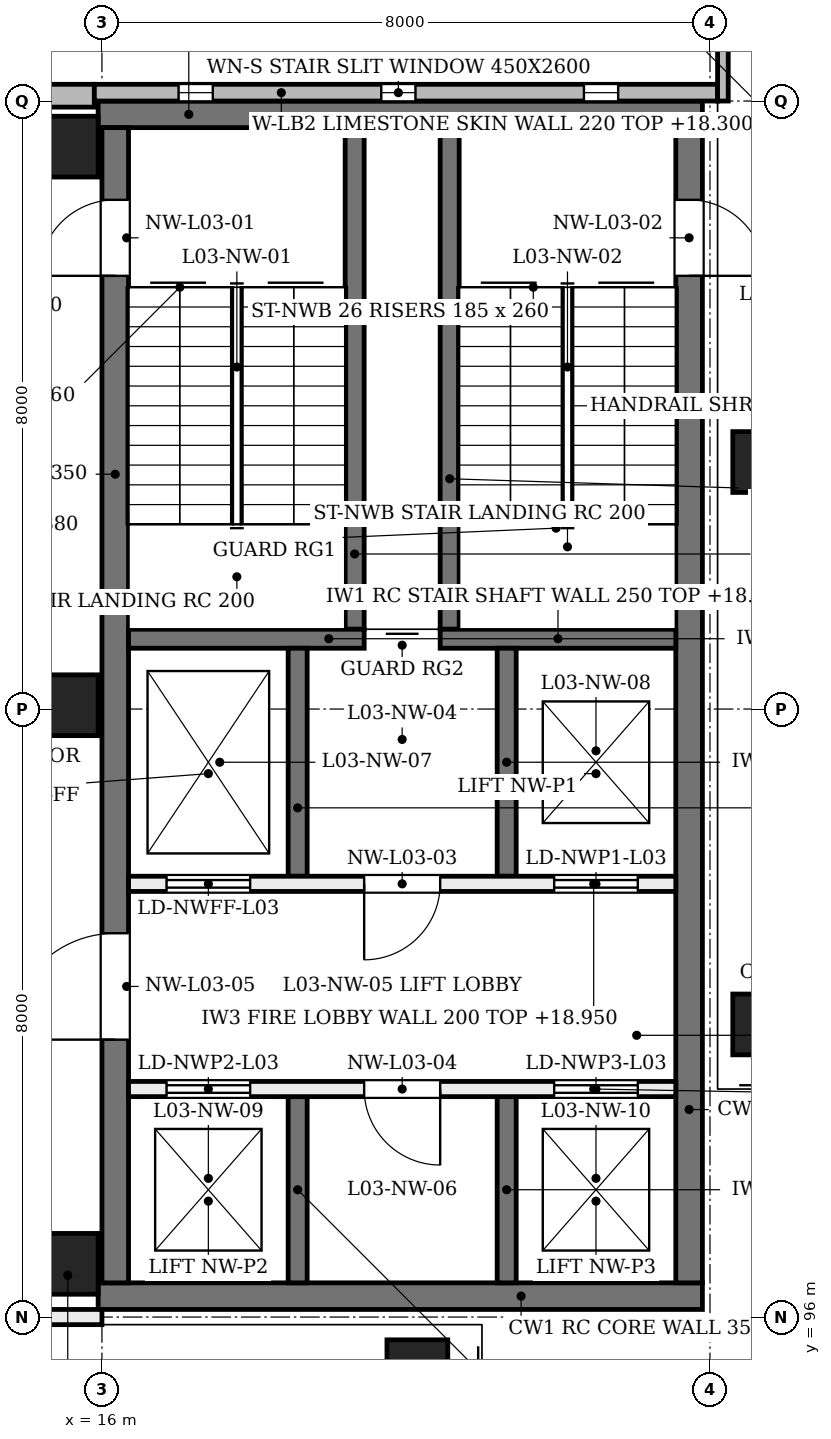
"""IFC4 building model, lengths in metres.
Left out: names, types, materials, properties, quantities, classifications, styles, units other than length and angle.
Written with IfcOpenShell. Run it as: python <this file> out.ifc"""

import sys

from ifc_helpers import new_model, si_unit, direction, frame, frame_2d, origin, origin_2d, place, context, subcontext, project, spatial, rectangle, extrude, element, fill, save


model = new_model("IFC4")
c1 = context("Model", 3, precision=1e-05, world=origin(), true_north=direction((0.0, 1.0)))
c2 = subcontext(c1, "Body", "Model", "MODEL_VIEW")
j1 = project(units=[si_unit("LENGTHUNIT", "METRE"), si_unit("PLANEANGLEUNIT", "RADIAN")], contexts=[c1])
p1 = place(None, origin())
s1 = spatial("IfcSite", under=j1, at=p1, CompositionType="ELEMENT")
p2 = place(p1, origin())
s2 = spatial("IfcBuilding", under=s1, at=p2, CompositionType="ELEMENT")
p3 = place(p2, frame((0.0, 0.0, 14.4)))
s3 = spatial("IfcBuildingStorey", under=s2, at=p3, CompositionType="ELEMENT", Elevation=14.4)
for number, where, z_axis, x_axis in (
    (1, (15.95, 96.275, 0.0), (0.0, 0.0, 1.0), (1.0, 0.0, 0.0)),
    (2, (15.95, 111.825, 0.0), (0.0, 0.0, 1.0), (1.0, 0.0, 0.0)),
):
    element("IfcWall", number, at=place(p3, frame(where, z_axis=z_axis, x_axis=x_axis)), inside=s3, PredefinedType="SHEAR", context=c2, shape_type="SweptSolid", body=[
        extrude(rectangle(XDim=7.95, YDim=0.35, at=frame_2d((3.975, 0.0))), origin(), (0.0, 0.0, 1.0), 4.58),
    ])
p4 = place(p3, frame((16.175, 96.45, 0.0), z_axis=(0.0, 0.0, 1.0), x_axis=(0.0, 1.0, 0.0)))
e3 = element("IfcWall", 3, at=p4, inside=s3, PredefinedType="SHEAR", context=c2, shape_type="SweptSolid", body=[
    extrude(rectangle(XDim=15.2, YDim=0.35, at=frame_2d((7.6, 0.0))), origin(), (0.0, 0.0, 1.0), 4.58),
])
p5 = place(p4, frame((13.25, 0.0, 0.0)))
e4 = element("IfcOpeningElement", 4, at=p5, cuts=e3, PredefinedType="OPENING", context=c2, shape_type="SweptSolid", body=[
    extrude(rectangle(XDim=1.0, YDim=2.1, at=frame_2d((0.5, 1.05))), frame((0.0, 0.185, 0.0), z_axis=(0.0, -1.0, 0.0), x_axis=(1.0, 0.0, 0.0)), (0.0, 0.0, 1.0), 0.37),
])
p6 = place(p4, frame((3.2, 0.0, 0.0)))
e5 = element("IfcOpeningElement", 5, at=p6, cuts=e3, PredefinedType="OPENING", context=c2, shape_type="SweptSolid", body=[
    extrude(rectangle(XDim=1.4, YDim=2.1, at=frame_2d((0.7, 1.05))), frame((0.0, 0.185, 0.0), z_axis=(0.0, -1.0, 0.0), x_axis=(1.0, 0.0, 0.0)), (0.0, 0.0, 1.0), 0.37),
])
p7 = place(p3, frame((23.725, 96.45, 0.0), z_axis=(0.0, 0.0, 1.0), x_axis=(0.0, 1.0, 0.0)))
e6 = element("IfcWall", 6, at=p7, inside=s3, PredefinedType="SHEAR", context=c2, shape_type="SweptSolid", body=[
    extrude(rectangle(XDim=15.2, YDim=0.35, at=frame_2d((7.6, 0.0))), origin(), (0.0, 0.0, 1.0), 4.58),
])
p8 = place(p7, frame((13.25, 0.0, 0.0)))
e7 = element("IfcOpeningElement", 7, at=p8, cuts=e6, PredefinedType="OPENING", context=c2, shape_type="SweptSolid", body=[
    extrude(rectangle(XDim=1.0, YDim=2.1, at=frame_2d((0.5, 1.05))), frame((0.0, 0.185, 0.0), z_axis=(0.0, -1.0, 0.0), x_axis=(1.0, 0.0, 0.0)), (0.0, 0.0, 1.0), 0.37),
])
for number, where, z_axis, x_axis in (
    (8, (15.55, 96.7, 0.0), (0.0, 0.0, 1.0), (1.0, 0.0, 0.0)),
    (9, (15.55, 104.05, 0.0), (0.0, 0.0, 1.0), (1.0, 0.0, 0.0)),
    (10, (15.55, 111.4, 0.0), (0.0, 0.0, 1.0), (1.0, 0.0, 0.0)),
):
    element("IfcColumn", number, at=place(p3, frame(where, z_axis=z_axis, x_axis=x_axis)), inside=s3, PredefinedType="COLUMN", context=c2, shape_type="SweptSolid", body=[
        extrude(rectangle(XDim=0.8, YDim=0.8, at=origin_2d()), origin(), (0.0, 0.0, 1.0), 4.8),
    ])
for number, where, z_axis, x_axis in (
    (11, (24.7, 99.6, 0.0), (0.0, 0.204, 0.979), (-1.0, 0.0, 0.0)),
    (12, (24.7, 107.0, 0.0), (0.0, 0.204, 0.979), (-1.0, 0.0, 0.0)),
    (13, (20.4, 95.3, 0.0), (-0.204, 0.0, 0.979), (0.0, -1.0, 0.0)),
):
    element("IfcColumn", number, at=place(p3, frame(where, z_axis=z_axis, x_axis=x_axis)), inside=s3, PredefinedType="COLUMN", context=c2, shape_type="SweptSolid", body=[
        extrude(rectangle(XDim=0.8, YDim=0.8, at=origin_2d()), origin(), (0.0, 0.0, 1.0), 4.903),
    ])
p9 = place(p3, frame((8.0, 112.07, 0.0), z_axis=(0.0, 0.0, 1.0), x_axis=(1.0, 0.0, 0.0)))
e14 = element("IfcWall", 14, at=p9, inside=s3, PredefinedType="SOLIDWALL", context=c2, shape_type="SweptSolid", body=[
    extrude(rectangle(XDim=7.9, YDim=0.3, at=frame_2d((3.95, 0.0))), origin(), (0.0, 0.0, 1.0), 3.9),
])
p10 = place(p9, frame((0.717, 0.0, 0.75)))
e15 = element("IfcOpeningElement", 15, at=p10, cuts=e14, PredefinedType="OPENING", context=c2, shape_type="SweptSolid", body=[
    extrude(rectangle(XDim=1.2, YDim=3.1, at=frame_2d((0.6, 1.55))), frame((0.0, 0.16, 0.0), z_axis=(0.0, -1.0, 0.0), x_axis=(1.0, 0.0, 0.0)), (0.0, 0.0, 1.0), 0.32),
])
p11 = place(p9, frame((3.35, 0.0, 0.75)))
e16 = element("IfcOpeningElement", 16, at=p11, cuts=e14, PredefinedType="OPENING", context=c2, shape_type="SweptSolid", body=[
    extrude(rectangle(XDim=1.2, YDim=3.1, at=frame_2d((0.6, 1.55))), frame((0.0, 0.16, 0.0), z_axis=(0.0, -1.0, 0.0), x_axis=(1.0, 0.0, 0.0)), (0.0, 0.0, 1.0), 0.32),
])
p12 = place(p9, frame((5.983, 0.0, 0.75)))
e17 = element("IfcOpeningElement", 17, at=p12, cuts=e14, PredefinedType="OPENING", context=c2, shape_type="SweptSolid", body=[
    extrude(rectangle(XDim=1.2, YDim=3.1, at=frame_2d((0.6, 1.55))), frame((0.0, 0.16, 0.0), z_axis=(0.0, -1.0, 0.0), x_axis=(1.0, 0.0, 0.0)), (0.0, 0.0, 1.0), 0.32),
])
p13 = place(p3, frame((15.9, 112.11, 0.0), z_axis=(0.0, 0.0, 1.0), x_axis=(1.0, 0.0, 0.0)))
e18 = element("IfcWall", 18, at=p13, inside=s3, PredefinedType="SOLIDWALL", context=c2, shape_type="SweptSolid", body=[
    extrude(rectangle(XDim=8.2, YDim=0.22, at=frame_2d((4.1, 0.0))), origin(), (0.0, 0.0, 1.0), 3.9),
])
p14 = place(p13, frame((1.108, 0.0, 0.9)))
e19 = element("IfcOpeningElement", 19, at=p14, cuts=e18, PredefinedType="OPENING", context=c2, shape_type="SweptSolid", body=[
    extrude(rectangle(XDim=0.45, YDim=2.6, at=frame_2d((0.225, 1.3))), frame((0.0, 0.12, 0.0), z_axis=(0.0, -1.0, 0.0), x_axis=(1.0, 0.0, 0.0)), (0.0, 0.0, 1.0), 0.24),
])
p15 = place(p13, frame((3.775, 0.0, 0.9)))
e20 = element("IfcOpeningElement", 20, at=p15, cuts=e18, PredefinedType="OPENING", context=c2, shape_type="SweptSolid", body=[
    extrude(rectangle(XDim=0.45, YDim=2.6, at=frame_2d((0.225, 1.3))), frame((0.0, 0.12, 0.0), z_axis=(0.0, -1.0, 0.0), x_axis=(1.0, 0.0, 0.0)), (0.0, 0.0, 1.0), 0.24),
])
p16 = place(p13, frame((6.442, 0.0, 0.9)))
e21 = element("IfcOpeningElement", 21, at=p16, cuts=e18, PredefinedType="OPENING", context=c2, shape_type="SweptSolid", body=[
    extrude(rectangle(XDim=0.45, YDim=2.6, at=frame_2d((0.225, 1.3))), frame((0.0, 0.12, 0.0), z_axis=(0.0, -1.0, 0.0), x_axis=(1.0, 0.0, 0.0)), (0.0, 0.0, 1.0), 0.24),
])
p17 = place(p3, frame((24.17, 112.0, 0.0), z_axis=(0.0, 0.0, 1.0), x_axis=(0.0, 1.0, 0.0)))
e22 = element("IfcWall", 22, at=p17, inside=s3, PredefinedType="SOLIDWALL", context=c2, shape_type="SweptSolid", body=[
    extrude(rectangle(XDim=3.0, YDim=0.14, at=frame_2d((1.5, 0.0))), origin(), (0.0, 0.0, 1.0), 3.9),
])
for number, where, z_axis, x_axis in (
    (23, (19.325, 111.65, 0.0), (0.0, 0.0, 1.0), (0.0, -1.0, 0.0)),
    (24, (20.575, 111.65, 0.0), (0.0, 0.0, 1.0), (0.0, -1.0, 0.0)),
):
    element("IfcWall", number, at=place(p3, frame(where, z_axis=z_axis, x_axis=x_axis)), inside=s3, PredefinedType="SOLIDWALL", context=c2, shape_type="SweptSolid", body=[
        extrude(rectangle(XDim=6.6, YDim=0.25, at=frame_2d((3.3, 0.0))), origin(), (0.0, 0.0, 1.0), 4.55),
    ])
p18 = place(p3, frame((16.35, 104.925, 0.0), z_axis=(0.0, 0.0, 1.0), x_axis=(1.0, 0.0, 0.0)))
e25 = element("IfcWall", 25, at=p18, inside=s3, PredefinedType="SOLIDWALL", context=c2, shape_type="SweptSolid", body=[
    extrude(rectangle(XDim=3.1, YDim=0.25, at=frame_2d((1.55, 0.0))), origin(), (0.0, 0.0, 1.0), 4.55),
])
p19 = place(p3, frame((20.45, 104.925, 0.0), z_axis=(0.0, 0.0, 1.0), x_axis=(1.0, 0.0, 0.0)))
e26 = element("IfcWall", 26, at=p19, inside=s3, PredefinedType="SOLIDWALL", context=c2, shape_type="SweptSolid", body=[
    extrude(rectangle(XDim=3.1, YDim=0.25, at=frame_2d((1.55, 0.0))), origin(), (0.0, 0.0, 1.0), 4.55),
])
p20 = place(p3, frame((18.575, 104.8, 0.0), z_axis=(0.0, 0.0, 1.0), x_axis=(0.0, -1.0, 0.0)))
e27 = element("IfcWall", 27, at=p20, inside=s3, PredefinedType="SOLIDWALL", context=c2, shape_type="SweptSolid", body=[
    extrude(rectangle(XDim=3.0, YDim=0.25, at=frame_2d((1.5, 0.0))), origin(), (0.0, 0.0, 1.0), 4.55),
])
p21 = place(p3, frame((18.575, 98.9, 0.0), z_axis=(0.0, 0.0, 1.0), x_axis=(0.0, -1.0, 0.0)))
e28 = element("IfcWall", 28, at=p21, inside=s3, PredefinedType="SOLIDWALL", context=c2, shape_type="SweptSolid", body=[
    extrude(rectangle(XDim=2.45, YDim=0.25, at=frame_2d((1.225, 0.0))), origin(), (0.0, 0.0, 1.0), 4.55),
])
p22 = place(p3, frame((21.325, 104.8, 0.0), z_axis=(0.0, 0.0, 1.0), x_axis=(0.0, -1.0, 0.0)))
e29 = element("IfcWall", 29, at=p22, inside=s3, PredefinedType="SOLIDWALL", context=c2, shape_type="SweptSolid", body=[
    extrude(rectangle(XDim=3.0, YDim=0.25, at=frame_2d((1.5, 0.0))), origin(), (0.0, 0.0, 1.0), 4.55),
])
p23 = place(p3, frame((21.325, 98.9, 0.0), z_axis=(0.0, 0.0, 1.0), x_axis=(0.0, -1.0, 0.0)))
e30 = element("IfcWall", 30, at=p23, inside=s3, PredefinedType="SOLIDWALL", context=c2, shape_type="SweptSolid", body=[
    extrude(rectangle(XDim=2.45, YDim=0.25, at=frame_2d((1.225, 0.0))), origin(), (0.0, 0.0, 1.0), 4.55),
])
p24 = place(p3, frame((16.35, 101.7, 0.0), z_axis=(0.0, 0.0, 1.0), x_axis=(1.0, 0.0, 0.0)))
e31 = element("IfcWall", 31, at=p24, inside=s3, PredefinedType="SOLIDWALL", context=c2, shape_type="SweptSolid", body=[
    extrude(rectangle(XDim=7.2, YDim=0.2, at=frame_2d((3.6, 0.0))), origin(), (0.0, 0.0, 1.0), 4.55),
])
p25 = place(p24, frame((0.5, 0.0, 0.0)))
e32 = element("IfcOpeningElement", 32, at=p25, cuts=e31, PredefinedType="OPENING", context=c2, shape_type="SweptSolid", body=[
    extrude(rectangle(XDim=1.1, YDim=2.1, at=frame_2d((0.55, 1.05))), frame((0.0, 0.11, 0.0), z_axis=(0.0, -1.0, 0.0), x_axis=(1.0, 0.0, 0.0)), (0.0, 0.0, 1.0), 0.22),
])
p26 = place(p24, frame((5.6, 0.0, 0.0)))
e33 = element("IfcOpeningElement", 33, at=p26, cuts=e31, PredefinedType="OPENING", context=c2, shape_type="SweptSolid", body=[
    extrude(rectangle(XDim=1.1, YDim=2.1, at=frame_2d((0.55, 1.05))), frame((0.0, 0.11, 0.0), z_axis=(0.0, -1.0, 0.0), x_axis=(1.0, 0.0, 0.0)), (0.0, 0.0, 1.0), 0.22),
])
p27 = place(p24, frame((3.1, 0.0, 0.0)))
e34 = element("IfcOpeningElement", 34, at=p27, cuts=e31, PredefinedType="OPENING", context=c2, shape_type="SweptSolid", body=[
    extrude(rectangle(XDim=1.0, YDim=2.1, at=frame_2d((0.5, 1.05))), frame((0.0, 0.11, 0.0), z_axis=(0.0, -1.0, 0.0), x_axis=(1.0, 0.0, 0.0)), (0.0, 0.0, 1.0), 0.22),
])
p28 = place(p3, frame((16.35, 99.0, 0.0), z_axis=(0.0, 0.0, 1.0), x_axis=(1.0, 0.0, 0.0)))
e35 = element("IfcWall", 35, at=p28, inside=s3, PredefinedType="SOLIDWALL", context=c2, shape_type="SweptSolid", body=[
    extrude(rectangle(XDim=7.2, YDim=0.2, at=frame_2d((3.6, 0.0))), origin(), (0.0, 0.0, 1.0), 4.55),
])
p29 = place(p28, frame((0.5, 0.0, 0.0)))
e36 = element("IfcOpeningElement", 36, at=p29, cuts=e35, PredefinedType="OPENING", context=c2, shape_type="SweptSolid", body=[
    extrude(rectangle(XDim=1.1, YDim=2.1, at=frame_2d((0.55, 1.05))), frame((0.0, 0.11, 0.0), z_axis=(0.0, -1.0, 0.0), x_axis=(1.0, 0.0, 0.0)), (0.0, 0.0, 1.0), 0.22),
])
p30 = place(p28, frame((5.6, 0.0, 0.0)))
e37 = element("IfcOpeningElement", 37, at=p30, cuts=e35, PredefinedType="OPENING", context=c2, shape_type="SweptSolid", body=[
    extrude(rectangle(XDim=1.1, YDim=2.1, at=frame_2d((0.55, 1.05))), frame((0.0, 0.11, 0.0), z_axis=(0.0, -1.0, 0.0), x_axis=(1.0, 0.0, 0.0)), (0.0, 0.0, 1.0), 0.22),
])
p31 = place(p28, frame((3.1, 0.0, 0.0)))
e38 = element("IfcOpeningElement", 38, at=p31, cuts=e35, PredefinedType="OPENING", context=c2, shape_type="SweptSolid", body=[
    extrude(rectangle(XDim=1.0, YDim=2.1, at=frame_2d((0.5, 1.05))), frame((0.0, 0.11, 0.0), z_axis=(0.0, -1.0, 0.0), x_axis=(1.0, 0.0, 0.0)), (0.0, 0.0, 1.0), 0.22),
])
p32 = place(p3, frame((14.0, 96.0, 0.0), z_axis=(0.0, 0.0, 1.0), x_axis=(1.0, 0.0, 0.0)))
e39 = element("IfcWall", 39, at=p32, inside=s3, PredefinedType="PARTITIONING", context=c2, shape_type="SweptSolid", body=[
    extrude(rectangle(XDim=2.0, YDim=0.2, at=frame_2d((1.0, 0.0))), origin(), (0.0, 0.0, 1.0), 3.88),
])
p33 = place(p32, frame((0.05, 0.0, 0.0)))
e40 = element("IfcOpeningElement", 40, at=p33, cuts=e39, PredefinedType="OPENING", context=c2, shape_type="SweptSolid", body=[
    extrude(rectangle(XDim=1.0, YDim=2.1, at=frame_2d((0.5, 1.05))), frame((0.0, 0.11, 0.0), z_axis=(0.0, -1.0, 0.0), x_axis=(1.0, 0.0, 0.0)), (0.0, 0.0, 1.0), 0.22),
])
p34 = place(p14, origin())
e41 = element("IfcWindow", 41, at=p34, inside=s3, PartitioningType="SINGLE_PANEL", PredefinedType="WINDOW", context=c2, shape_type="SweptSolid", body=[
    extrude(rectangle(XDim=0.45, YDim=2.6, at=frame_2d((0.225, 1.3))), frame((0.0, 0.03, 0.0), z_axis=(0.0, -1.0, 0.0), x_axis=(1.0, 0.0, 0.0)), (0.0, 0.0, 1.0), 0.06),
])
fill(e19, e41)
p35 = place(p15, origin())
e42 = element("IfcWindow", 42, at=p35, inside=s3, PartitioningType="SINGLE_PANEL", PredefinedType="WINDOW", context=c2, shape_type="SweptSolid", body=[
    extrude(rectangle(XDim=0.45, YDim=2.6, at=frame_2d((0.225, 1.3))), frame((0.0, 0.03, 0.0), z_axis=(0.0, -1.0, 0.0), x_axis=(1.0, 0.0, 0.0)), (0.0, 0.0, 1.0), 0.06),
])
fill(e20, e42)
p36 = place(p16, origin())
e43 = element("IfcWindow", 43, at=p36, inside=s3, PartitioningType="SINGLE_PANEL", PredefinedType="WINDOW", context=c2, shape_type="SweptSolid", body=[
    extrude(rectangle(XDim=0.45, YDim=2.6, at=frame_2d((0.225, 1.3))), frame((0.0, 0.03, 0.0), z_axis=(0.0, -1.0, 0.0), x_axis=(1.0, 0.0, 0.0)), (0.0, 0.0, 1.0), 0.06),
])
fill(e21, e43)
p37 = place(p5, origin())
e44 = element("IfcDoor", 44, at=p37, inside=s3, OperationType="SINGLE_SWING_LEFT", PredefinedType="DOOR", context=c2, shape_type="SweptSolid", body=[
    extrude(rectangle(XDim=1.0, YDim=2.1, at=frame_2d((0.5, 1.05))), frame((0.0, 0.025, 0.0), z_axis=(0.0, -1.0, 0.0), x_axis=(1.0, 0.0, 0.0)), (0.0, 0.0, 1.0), 0.05),
])
fill(e4, e44)
p38 = place(p8, frame((1.0, 0.0, 0.0), z_axis=(0.0, 0.0, 1.0), x_axis=(-1.0, 0.0, 0.0)))
e45 = element("IfcDoor", 45, at=p38, inside=s3, OperationType="SINGLE_SWING_LEFT", PredefinedType="DOOR", context=c2, shape_type="SweptSolid", body=[
    extrude(rectangle(XDim=1.0, YDim=2.1, at=frame_2d((0.5, 1.05))), frame((0.0, 0.025, 0.0), z_axis=(0.0, -1.0, 0.0), x_axis=(1.0, 0.0, 0.0)), (0.0, 0.0, 1.0), 0.05),
])
fill(e7, e45)
p39 = place(p25, frame((1.1, 0.0, 0.0), z_axis=(0.0, 0.0, 1.0), x_axis=(-1.0, 0.0, 0.0)))
e46 = element("IfcDoor", 46, at=p39, inside=s3, OperationType="DOUBLE_DOOR_SLIDING", PredefinedType="DOOR", context=c2, shape_type="SweptSolid", body=[
    extrude(rectangle(XDim=1.1, YDim=2.1, at=frame_2d((0.55, 1.05))), frame((0.0, 0.025, 0.0), z_axis=(0.0, -1.0, 0.0), x_axis=(1.0, 0.0, 0.0)), (0.0, 0.0, 1.0), 0.05),
])
fill(e32, e46)
p40 = place(p26, frame((1.1, 0.0, 0.0), z_axis=(0.0, 0.0, 1.0), x_axis=(-1.0, 0.0, 0.0)))
e47 = element("IfcDoor", 47, at=p40, inside=s3, OperationType="DOUBLE_DOOR_SLIDING", PredefinedType="DOOR", context=c2, shape_type="SweptSolid", body=[
    extrude(rectangle(XDim=1.1, YDim=2.1, at=frame_2d((0.55, 1.05))), frame((0.0, 0.025, 0.0), z_axis=(0.0, -1.0, 0.0), x_axis=(1.0, 0.0, 0.0)), (0.0, 0.0, 1.0), 0.05),
])
fill(e33, e47)
p41 = place(p29, origin())
e48 = element("IfcDoor", 48, at=p41, inside=s3, OperationType="DOUBLE_DOOR_SLIDING", PredefinedType="DOOR", context=c2, shape_type="SweptSolid", body=[
    extrude(rectangle(XDim=1.1, YDim=2.1, at=frame_2d((0.55, 1.05))), frame((0.0, 0.025, 0.0), z_axis=(0.0, -1.0, 0.0), x_axis=(1.0, 0.0, 0.0)), (0.0, 0.0, 1.0), 0.05),
])
fill(e36, e48)
p42 = place(p30, origin())
e49 = element("IfcDoor", 49, at=p42, inside=s3, OperationType="DOUBLE_DOOR_SLIDING", PredefinedType="DOOR", context=c2, shape_type="SweptSolid", body=[
    extrude(rectangle(XDim=1.1, YDim=2.1, at=frame_2d((0.55, 1.05))), frame((0.0, 0.025, 0.0), z_axis=(0.0, -1.0, 0.0), x_axis=(1.0, 0.0, 0.0)), (0.0, 0.0, 1.0), 0.05),
])
fill(e37, e49)
p43 = place(p27, frame((1.0, 0.0, 0.0), z_axis=(0.0, 0.0, 1.0), x_axis=(-1.0, 0.0, 0.0)))
e50 = element("IfcDoor", 50, at=p43, inside=s3, OperationType="SINGLE_SWING_LEFT", PredefinedType="DOOR", context=c2, shape_type="SweptSolid", body=[
    extrude(rectangle(XDim=1.0, YDim=2.1, at=frame_2d((0.5, 1.05))), frame((0.0, 0.025, 0.0), z_axis=(0.0, -1.0, 0.0), x_axis=(1.0, 0.0, 0.0)), (0.0, 0.0, 1.0), 0.05),
])
fill(e34, e50)
p44 = place(p31, origin())
e51 = element("IfcDoor", 51, at=p44, inside=s3, OperationType="SINGLE_SWING_RIGHT", PredefinedType="DOOR", context=c2, shape_type="SweptSolid", body=[
    extrude(rectangle(XDim=1.0, YDim=2.1, at=frame_2d((0.5, 1.05))), frame((0.0, 0.025, 0.0), z_axis=(0.0, -1.0, 0.0), x_axis=(1.0, 0.0, 0.0)), (0.0, 0.0, 1.0), 0.05),
])
fill(e38, e51)
p45 = place(p6, origin())
e52 = element("IfcDoor", 52, at=p45, inside=s3, OperationType="SINGLE_SWING_LEFT", PredefinedType="DOOR", context=c2, shape_type="SweptSolid", body=[
    extrude(rectangle(XDim=1.4, YDim=2.1, at=frame_2d((0.7, 1.05))), frame((0.0, 0.025, 0.0), z_axis=(0.0, -1.0, 0.0), x_axis=(1.0, 0.0, 0.0)), (0.0, 0.0, 1.0), 0.05),
])
fill(e5, e52)
save(model, sys.argv[1])
